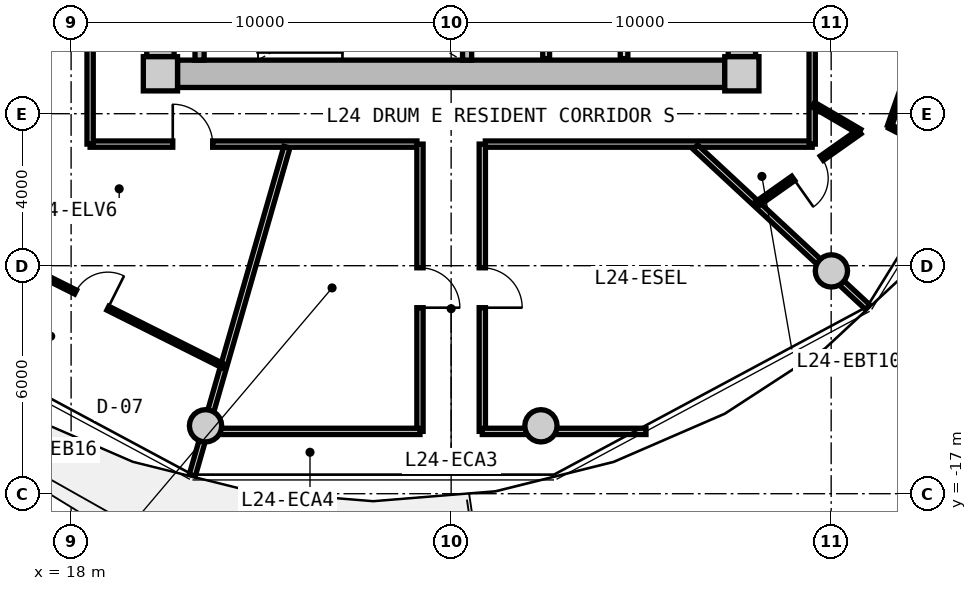
"""IFC4 building model, lengths in metres.
Left out: names, types, materials, properties, quantities, classifications, styles, units other than length and angle.
Written with IfcOpenShell. Run it as: python <this file> out.ifc"""

import sys

from ifc_helpers import new_model, si_unit, direction, frame, frame_2d, origin, origin_2d, place, context, subcontext, project, spatial, rectangle, circle, extrude, source, transform, mapped, element, fill, save


model = new_model("IFC4")
c1 = context("Model", 3, precision=1e-05, world=origin(), true_north=direction((0.0, 1.0)))
c2 = subcontext(c1, "Body", "Model", "MODEL_VIEW")
j1 = project(units=[si_unit("LENGTHUNIT", "METRE"), si_unit("PLANEANGLEUNIT", "RADIAN")], contexts=[c1])
p1 = place(None, origin())
s1 = spatial("IfcSite", under=j1, at=p1, CompositionType="ELEMENT")
p2 = place(p1, origin())
s2 = spatial("IfcBuilding", under=s1, at=p2, CompositionType="ELEMENT")
p3 = place(p2, frame((0.0, 0.0, 81.0)))
s3 = spatial("IfcBuildingStorey", under=s2, at=p3, CompositionType="ELEMENT", Elevation=81.0)
m1 = source(origin(), c2, "Body", "SweptSolid", [
    extrude(rectangle(XDim=0.9, YDim=0.9, at=origin_2d()), origin(), (0.0, 0.0, 1.0), 3.05),
])
for number, where, z_axis, x_axis in (
    (1, (20.35, -5.95, 0.0), (0.0, 0.0, 1.0), (1.0, 0.0, 0.0)),
    (2, (35.65, -5.95, 0.0), (0.0, 0.0, 1.0), (1.0, 0.0, 0.0)),
):
    element("IfcColumn", number, at=place(p3, frame(where, z_axis=z_axis, x_axis=x_axis)), inside=s3, PredefinedType="COLUMN", context=c2, shape_type="MappedRepresentation", body=[
        mapped(m1, transform((0.0, 0.0, 0.0), x_axis=(1.0, 0.0, 0.0), y_axis=(0.0, 1.0, 0.0), z_axis=(0.0, 0.0, 1.0), scale=1.0)),
    ])
m2 = source(origin(), c2, "Body", "SweptSolid", [
    extrude(rectangle(XDim=14.4, YDim=0.72, at=frame_2d((7.2, 0.0))), origin(), (0.0, 0.0, 1.0), 2.79),
])
p4 = place(p3, frame((35.2, -5.95, 0.0), z_axis=(0.0, 0.0, 1.0), x_axis=(-1.0, 0.0, 0.0)))
e3 = element("IfcWall", 3, at=p4, inside=s3, PredefinedType="SHEAR", context=c2, shape_type="MappedRepresentation", body=[
    mapped(m2, transform((0.0, 0.0, 0.0), x_axis=(1.0, 0.0, 0.0), y_axis=(0.0, 1.0, 0.0), z_axis=(0.0, 0.0, 1.0), scale=1.0)),
])
m3 = source(origin(), c2, "Body", "SweptSolid", [
    extrude(rectangle(XDim=11.0, YDim=0.72, at=frame_2d((5.5, 0.0))), origin(), (0.0, 0.0, 1.0), 2.79),
])
p5 = place(p3, frame((20.35, -5.5, 0.0), z_axis=(0.0, 0.0, 1.0), x_axis=(0.0, 1.0, 0.0)))
e4 = element("IfcWall", 4, at=p5, inside=s3, PredefinedType="SHEAR", context=c2, shape_type="MappedRepresentation", body=[
    mapped(m3, transform((0.0, 0.0, 0.0), x_axis=(1.0, 0.0, 0.0), y_axis=(0.0, 1.0, 0.0), z_axis=(0.0, 0.0, 1.0), scale=1.0)),
])
p6 = place(p5, frame((3.8, 0.0, 0.0)))
e5 = element("IfcOpeningElement", 5, at=p6, cuts=e4, PredefinedType="OPENING", context=c2, shape_type="SweptSolid", body=[
    extrude(rectangle(XDim=1.2, YDim=2.15, at=frame_2d((0.6, 1.075))), frame((0.0, 0.37, 0.0), z_axis=(0.0, -1.0, 0.0), x_axis=(1.0, 0.0, 0.0)), (0.0, 0.0, 1.0), 0.74),
])
p7 = place(p3, frame((35.65, 5.5, 0.0), z_axis=(0.0, 0.0, 1.0), x_axis=(0.0, -1.0, 0.0)))
e6 = element("IfcWall", 6, at=p7, inside=s3, PredefinedType="SHEAR", context=c2, shape_type="MappedRepresentation", body=[
    mapped(m3, transform((0.0, 0.0, 0.0), x_axis=(1.0, 0.0, 0.0), y_axis=(0.0, 1.0, 0.0), z_axis=(0.0, 0.0, 1.0), scale=1.0)),
])
p8 = place(p7, frame((5.65, 0.0, 0.0)))
e7 = element("IfcOpeningElement", 7, at=p8, cuts=e6, PredefinedType="OPENING", context=c2, shape_type="SweptSolid", body=[
    extrude(rectangle(XDim=1.2, YDim=2.15, at=frame_2d((0.6, 1.075))), frame((0.0, 0.37, 0.0), z_axis=(0.0, -1.0, 0.0), x_axis=(1.0, 0.0, 0.0)), (0.0, 0.0, 1.0), 0.74),
])
m4 = source(origin(), c2, "Body", "SweptSolid", [
    extrude(circle(Radius=0.425, at=origin_2d()), origin(), (0.0, 0.0, 1.0), 3.05),
])
for number, where, z_axis, x_axis in (
    (8, (21.537, -15.213, 0.0), (0.0, 0.0, 1.0), (1.0, 0.0, 0.0)),
    (9, (30.363, -15.213, 0.0), (0.0, 0.0, 1.0), (1.0, 0.0, 0.0)),
    (10, (38.006, -11.137, 0.0), (0.0, 0.0, 1.0), (1.0, 0.0, 0.0)),
):
    element("IfcColumn", number, at=place(p3, frame(where, z_axis=z_axis, x_axis=x_axis)), inside=s3, PredefinedType="COLUMN", context=c2, shape_type="MappedRepresentation", body=[
        mapped(m4, transform((0.0, 0.0, 0.0), x_axis=(1.0, 0.0, 0.0), y_axis=(0.0, 1.0, 0.0), z_axis=(0.0, 0.0, 1.0), scale=1.0)),
    ])
m5 = source(origin(), c2, "Body", "SweptSolid", [
    extrude(rectangle(XDim=3.14, YDim=0.24, at=frame_2d((1.57, 0.0))), origin(), (0.0, 0.0, 1.0), 2.79),
])
for number, where, z_axis, x_axis in (
    (11, (21.38, -5.59, 0.0), (0.0, 0.0, 1.0), (0.0, 1.0, 0.0)),
    (12, (28.42, -5.59, 0.0), (0.0, 0.0, 1.0), (0.0, 1.0, 0.0)),
):
    element("IfcWall", number, at=place(p3, frame(where, z_axis=z_axis, x_axis=x_axis)), inside=s3, PredefinedType="PARTITIONING", context=c2, shape_type="MappedRepresentation", body=[
        mapped(m5, transform((0.0, 0.0, 0.0), x_axis=(1.0, 0.0, 0.0), y_axis=(0.0, 1.0, 0.0), z_axis=(0.0, 0.0, 1.0), scale=1.0)),
    ])
m6 = source(origin(), c2, "Body", "SweptSolid", [
    extrude(rectangle(XDim=3.8, YDim=0.2, at=frame_2d((1.9, 0.0))), origin(), (0.0, 0.0, 1.0), 2.775),
])
p9 = place(p3, frame((32.55, -5.55, 0.0), z_axis=(0.0, 0.0, 1.0), x_axis=(0.0, 1.0, 0.0)))
e13 = element("IfcWall", 13, at=p9, inside=s3, PredefinedType="PARTITIONING", context=c2, shape_type="MappedRepresentation", body=[
    mapped(m6, transform((0.0, 0.0, 0.0), x_axis=(1.0, 0.0, 0.0), y_axis=(0.0, 1.0, 0.0), z_axis=(0.0, 0.0, 1.0), scale=1.0)),
])
m7 = source(origin(), c2, "Body", "SweptSolid", [
    extrude(rectangle(XDim=3.22, YDim=0.18, at=frame_2d((1.61, 0.0))), origin(), (0.0, 0.0, 1.0), 2.775),
])
p10 = place(p3, frame((30.5, -5.55, 0.0), z_axis=(0.0, 0.0, 1.0), x_axis=(0.0, 1.0, 0.0)))
e14 = element("IfcWall", 14, at=p10, inside=s3, PredefinedType="PARTITIONING", context=c2, shape_type="MappedRepresentation", body=[
    mapped(m7, transform((0.0, 0.0, 0.0), x_axis=(1.0, 0.0, 0.0), y_axis=(0.0, 1.0, 0.0), z_axis=(0.0, 0.0, 1.0), scale=1.0)),
])
m8 = source(origin(), c2, "Body", "SweptSolid", [
    extrude(rectangle(XDim=8.6, YDim=0.165, at=frame_2d((4.3, 0.0))), origin(), (0.0, 0.0, 1.0), 2.775),
])
p11 = place(p3, frame((37.5, -7.8, 0.0), z_axis=(0.0, 0.0, 1.0), x_axis=(-1.0, 0.0, 0.0)))
e15 = element("IfcWall", 15, at=p11, inside=s3, PredefinedType="PARTITIONING", context=c2, shape_type="MappedRepresentation", body=[
    mapped(m8, transform((0.0, 0.0, 0.0), x_axis=(1.0, 0.0, 0.0), y_axis=(0.0, 1.0, 0.0), z_axis=(0.0, 0.0, 1.0), scale=1.0)),
])
p12 = place(p3, frame((27.1, -7.8, 0.0), z_axis=(0.0, 0.0, 1.0), x_axis=(-1.0, 0.0, 0.0)))
e16 = element("IfcWall", 16, at=p12, inside=s3, PredefinedType="PARTITIONING", context=c2, shape_type="MappedRepresentation", body=[
    mapped(m8, transform((0.0, 0.0, 0.0), x_axis=(1.0, 0.0, 0.0), y_axis=(0.0, 1.0, 0.0), z_axis=(0.0, 0.0, 1.0), scale=1.0)),
])
p13 = place(p12, frame((5.375, 0.0, 0.0)))
e17 = element("IfcOpeningElement", 17, at=p13, cuts=e16, PredefinedType="OPENING", context=c2, shape_type="SweptSolid", body=[
    extrude(rectangle(XDim=1.05, YDim=2.15, at=frame_2d((0.525, 1.075))), frame((0.0, 0.093, 0.0), z_axis=(0.0, -1.0, 0.0), x_axis=(1.0, 0.0, 0.0)), (0.0, 0.0, 1.0), 0.185),
])
m9 = source(origin(), c2, "Body", "SweptSolid", [
    extrude(rectangle(XDim=15.6, YDim=0.165, at=frame_2d((7.8, 0.0))), origin(), (0.0, 0.0, 1.0), 2.775),
])
p14 = place(p3, frame((18.5, -7.8, 0.0), z_axis=(0.0, 0.0, 1.0), x_axis=(0.0, 1.0, 0.0)))
e18 = element("IfcWall", 18, at=p14, inside=s3, PredefinedType="PARTITIONING", context=c2, shape_type="MappedRepresentation", body=[
    mapped(m9, transform((0.0, 0.0, 0.0), x_axis=(1.0, 0.0, 0.0), y_axis=(0.0, 1.0, 0.0), z_axis=(0.0, 0.0, 1.0), scale=1.0)),
])
p15 = place(p14, frame((11.623, 0.0, 0.0)))
e19 = element("IfcOpeningElement", 19, at=p15, cuts=e18, PredefinedType="OPENING", context=c2, shape_type="SweptSolid", body=[
    extrude(rectangle(XDim=1.25, YDim=2.2, at=frame_2d((0.625, 1.1))), frame((0.0, 0.093, 0.0), z_axis=(0.0, -1.0, 0.0), x_axis=(1.0, 0.0, 0.0)), (0.0, 0.0, 1.0), 0.185),
])
p16 = place(p14, frame((7.175, 0.0, 0.0)))
e20 = element("IfcOpeningElement", 20, at=p16, cuts=e18, PredefinedType="OPENING", context=c2, shape_type="SweptSolid", body=[
    extrude(rectangle(XDim=1.25, YDim=2.2, at=frame_2d((0.625, 1.1))), frame((0.0, 0.093, 0.0), z_axis=(0.0, -1.0, 0.0), x_axis=(1.0, 0.0, 0.0)), (0.0, 0.0, 1.0), 0.185),
])
p17 = place(p3, frame((37.5, 7.8, 0.0), z_axis=(0.0, 0.0, 1.0), x_axis=(0.0, -1.0, 0.0)))
e21 = element("IfcWall", 21, at=p17, inside=s3, PredefinedType="PARTITIONING", context=c2, shape_type="MappedRepresentation", body=[
    mapped(m9, transform((0.0, 0.0, 0.0), x_axis=(1.0, 0.0, 0.0), y_axis=(0.0, 1.0, 0.0), z_axis=(0.0, 0.0, 1.0), scale=1.0)),
])
p18 = place(p17, frame((6.87, 0.0, 0.0)))
e22 = element("IfcOpeningElement", 22, at=p18, cuts=e21, PredefinedType="OPENING", context=c2, shape_type="SweptSolid", body=[
    extrude(rectangle(XDim=1.05, YDim=2.15, at=frame_2d((0.525, 1.075))), frame((0.0, 0.093, 0.0), z_axis=(0.0, -1.0, 0.0), x_axis=(1.0, 0.0, 0.0)), (0.0, 0.0, 1.0), 0.185),
])
m10 = source(origin(), c2, "Body", "SweptSolid", [
    extrude(rectangle(XDim=8.989, YDim=0.165, at=frame_2d((4.495, 0.0))), origin(), (0.0, 0.0, 1.0), 2.275),
])
p19 = place(p3, frame((23.678, -7.88, 0.0), z_axis=(0.0, 0.0, 1.0), x_axis=(-0.27702323008, -0.960863221274, 0.0)))
e23 = element("IfcWall", 23, at=p19, inside=s3, PredefinedType="PARTITIONING", context=c2, shape_type="MappedRepresentation", body=[
    mapped(m10, transform((0.0, 0.0, 0.0), x_axis=(1.0, 0.0, 0.0), y_axis=(0.0, 1.0, 0.0), z_axis=(0.0, 0.0, 1.0), scale=1.0)),
])
m11 = source(origin(), c2, "Body", "SweptSolid", [
    extrude(rectangle(XDim=6.187, YDim=0.165, at=frame_2d((3.093, 0.0))), origin(), (0.0, 0.0, 1.0), 2.275),
])
p20 = place(p3, frame((34.429, -7.88, 0.0), z_axis=(0.0, 0.0, 1.0), x_axis=(0.732501077882, -0.680765870841, 0.0)))
e24 = element("IfcWall", 24, at=p20, inside=s3, PredefinedType="PARTITIONING", context=c2, shape_type="MappedRepresentation", body=[
    mapped(m11, transform((0.0, 0.0, 0.0), x_axis=(1.0, 0.0, 0.0), y_axis=(0.0, 1.0, 0.0), z_axis=(0.0, 0.0, 1.0), scale=1.0)),
])
m12 = source(origin(), c2, "Body", "SweptSolid", [
    extrude(rectangle(XDim=7.56, YDim=0.165, at=frame_2d((3.78, 0.0))), origin(), (0.0, 0.0, 1.0), 2.775),
])
p21 = place(p3, frame((27.18, -15.36, 0.0), z_axis=(0.0, 0.0, 1.0), x_axis=(0.0, 1.0, 0.0)))
e25 = element("IfcWall", 25, at=p21, inside=s3, PredefinedType="PARTITIONING", context=c2, shape_type="MappedRepresentation", body=[
    mapped(m12, transform((0.0, 0.0, 0.0), x_axis=(1.0, 0.0, 0.0), y_axis=(0.0, 1.0, 0.0), z_axis=(0.0, 0.0, 1.0), scale=1.0)),
])
p22 = place(p21, frame((3.255, 0.0, 0.0)))
e26 = element("IfcOpeningElement", 26, at=p22, cuts=e25, PredefinedType="OPENING", context=c2, shape_type="SweptSolid", body=[
    extrude(rectangle(XDim=1.05, YDim=2.15, at=frame_2d((0.525, 1.075))), frame((0.0, 0.093, 0.0), z_axis=(0.0, -1.0, 0.0), x_axis=(1.0, 0.0, 0.0)), (0.0, 0.0, 1.0), 0.185),
])
m13 = source(origin(), c2, "Body", "SweptSolid", [
    extrude(rectangle(XDim=5.814, YDim=0.165, at=frame_2d((2.907, 0.0))), origin(), (0.0, 0.0, 1.0), 2.275),
])
p23 = place(p3, frame((21.366, -15.36, 0.0), z_axis=(0.0, 0.0, 1.0), x_axis=(1.0, 0.0, 0.0)))
e27 = element("IfcWall", 27, at=p23, inside=s3, PredefinedType="PARTITIONING", context=c2, shape_type="MappedRepresentation", body=[
    mapped(m13, transform((0.0, 0.0, 0.0), x_axis=(1.0, 0.0, 0.0), y_axis=(0.0, 1.0, 0.0), z_axis=(0.0, 0.0, 1.0), scale=1.0)),
])
p24 = place(p3, frame((28.82, -15.36, 0.0), z_axis=(0.0, 0.0, 1.0), x_axis=(0.0, 1.0, 0.0)))
e28 = element("IfcWall", 28, at=p24, inside=s3, PredefinedType="PARTITIONING", context=c2, shape_type="MappedRepresentation", body=[
    mapped(m12, transform((0.0, 0.0, 0.0), x_axis=(1.0, 0.0, 0.0), y_axis=(0.0, 1.0, 0.0), z_axis=(0.0, 0.0, 1.0), scale=1.0)),
])
p25 = place(p24, frame((3.255, 0.0, 0.0)))
e29 = element("IfcOpeningElement", 29, at=p25, cuts=e28, PredefinedType="OPENING", context=c2, shape_type="SweptSolid", body=[
    extrude(rectangle(XDim=1.05, YDim=2.15, at=frame_2d((0.525, 1.075))), frame((0.0, 0.093, 0.0), z_axis=(0.0, -1.0, 0.0), x_axis=(1.0, 0.0, 0.0)), (0.0, 0.0, 1.0), 0.185),
])
m14 = source(origin(), c2, "Body", "SweptSolid", [
    extrude(rectangle(XDim=4.307, YDim=0.165, at=frame_2d((2.153, 0.0))), origin(), (0.0, 0.0, 1.0), 2.275),
])
p26 = place(p3, frame((28.82, -15.36, 0.0), z_axis=(0.0, 0.0, 1.0), x_axis=(1.0, 0.0, 0.0)))
e30 = element("IfcWall", 30, at=p26, inside=s3, PredefinedType="PARTITIONING", context=c2, shape_type="MappedRepresentation", body=[
    mapped(m14, transform((0.0, 0.0, 0.0), x_axis=(1.0, 0.0, 0.0), y_axis=(0.0, 1.0, 0.0), z_axis=(0.0, 0.0, 1.0), scale=1.0)),
])
m15 = source(origin(), c2, "Body", "SweptSolid", [
    extrude(rectangle(XDim=7.767, YDim=0.115, at=frame_2d((3.884, 0.0))), origin(), (0.0, 0.0, 1.0), 2.775),
])
p27 = place(p3, frame((15.07, -10.167, 0.0), z_axis=(0.0, 0.0, 1.0), x_axis=(0.894188177352, -0.447691303783, 0.0)))
e31 = element("IfcWall", 31, at=p27, inside=s3, PredefinedType="PARTITIONING", context=c2, shape_type="MappedRepresentation", body=[
    mapped(m15, transform((0.0, 0.0, 0.0), x_axis=(1.0, 0.0, 0.0), y_axis=(0.0, 1.0, 0.0), z_axis=(0.0, 0.0, 1.0), scale=1.0)),
])
p28 = place(p27, frame((3.409, 0.0, 0.0)))
e32 = element("IfcOpeningElement", 32, at=p28, cuts=e31, PredefinedType="OPENING", context=c2, shape_type="SweptSolid", body=[
    extrude(rectangle(XDim=0.95, YDim=2.1, at=frame_2d((0.475, 1.05))), frame((0.0, 0.067, 0.0), z_axis=(0.0, -1.0, 0.0), x_axis=(1.0, 0.0, 0.0)), (0.0, 0.0, 1.0), 0.135),
])
m16 = source(origin(), c2, "Body", "SweptSolid", [
    extrude(rectangle(XDim=1.407, YDim=0.14, at=frame_2d((0.704, 0.0))), origin(), (0.0, 0.0, 1.0), 2.775),
])
p29 = place(p3, frame((37.53, -6.762, 0.0), z_axis=(0.0, 0.0, 1.0), x_axis=(0.863539718977, -0.504280828258, 0.0)))
e33 = element("IfcWall", 33, at=p29, inside=s3, PredefinedType="PARTITIONING", context=c2, shape_type="MappedRepresentation", body=[
    mapped(m16, transform((0.0, 0.0, 0.0), x_axis=(1.0, 0.0, 0.0), y_axis=(0.0, 1.0, 0.0), z_axis=(0.0, 0.0, 1.0), scale=1.0)),
])
m17 = source(origin(), c2, "Body", "SweptSolid", [
    extrude(rectangle(XDim=3.347, YDim=0.14, at=frame_2d((1.673, 0.0))), origin(), (0.0, 0.0, 1.0), 2.775),
])
p30 = place(p3, frame((38.745, -7.472, 0.0), z_axis=(0.0, 0.0, 1.0), x_axis=(-0.81705680263, -0.576557179537, 0.0)))
e34 = element("IfcWall", 34, at=p30, inside=s3, PredefinedType="PARTITIONING", context=c2, shape_type="MappedRepresentation", body=[
    mapped(m17, transform((0.0, 0.0, 0.0), x_axis=(1.0, 0.0, 0.0), y_axis=(0.0, 1.0, 0.0), z_axis=(0.0, 0.0, 1.0), scale=1.0)),
])
p31 = place(p30, frame((1.214, 0.0, 0.0)))
e35 = element("IfcOpeningElement", 35, at=p31, cuts=e34, PredefinedType="OPENING", context=c2, shape_type="SweptSolid", body=[
    extrude(rectangle(XDim=0.92, YDim=2.1, at=frame_2d((0.46, 1.05))), frame((0.0, 0.08, 0.0), z_axis=(0.0, -1.0, 0.0), x_axis=(1.0, 0.0, 0.0)), (0.0, 0.0, 1.0), 0.16),
])
m18 = source(origin(), c2, "Body", "SweptSolid", [
    extrude(rectangle(XDim=2.031, YDim=0.115, at=frame_2d((1.016, 0.0))), origin(), (0.0, 0.0, 1.0), 2.775),
])
p32 = place(p3, frame((39.535, -7.33, 0.0), z_axis=(0.0, 0.0, 1.0), x_axis=(0.889297578836, -0.457329002226, 0.0)))
e36 = element("IfcWall", 36, at=p32, inside=s3, PredefinedType="PARTITIONING", context=c2, shape_type="MappedRepresentation", body=[
    mapped(m18, transform((0.0, 0.0, 0.0), x_axis=(1.0, 0.0, 0.0), y_axis=(0.0, 1.0, 0.0), z_axis=(0.0, 0.0, 1.0), scale=1.0)),
])
m19 = source(origin(), c2, "Body", "SweptSolid", [
    extrude(rectangle(XDim=3.826, YDim=0.115, at=frame_2d((1.913, 0.0))), origin(), (0.0, 0.0, 1.0), 2.775),
])
p33 = place(p3, frame((39.535, -7.33, 0.0), z_axis=(0.0, 0.0, 1.0), x_axis=(0.330452740212, 0.943822539721, 0.0)))
e37 = element("IfcWall", 37, at=p33, inside=s3, PredefinedType="PARTITIONING", context=c2, shape_type="MappedRepresentation", body=[
    mapped(m19, transform((0.0, 0.0, 0.0), x_axis=(1.0, 0.0, 0.0), y_axis=(0.0, 1.0, 0.0), z_axis=(0.0, 0.0, 1.0), scale=1.0)),
])
p34 = place(p33, frame((1.438, 0.0, 0.0)))
e38 = element("IfcOpeningElement", 38, at=p34, cuts=e37, PredefinedType="OPENING", context=c2, shape_type="SweptSolid", body=[
    extrude(rectangle(XDim=0.95, YDim=2.1, at=frame_2d((0.475, 1.05))), frame((0.0, 0.067, 0.0), z_axis=(0.0, -1.0, 0.0), x_axis=(1.0, 0.0, 0.0)), (0.0, 0.0, 1.0), 0.135),
])
m20 = source(origin(), c2, "Body", "SweptSolid", [
    extrude(rectangle(XDim=1.05, YDim=2.15, at=frame_2d((0.525, 1.075))), frame((0.0, 0.025, 0.0), z_axis=(0.0, -1.0, 0.0), x_axis=(1.0, 0.0, 0.0)), (0.0, 0.0, 1.0), 0.05),
])
p35 = place(p22, frame((1.05, 0.0, 0.0), z_axis=(0.0, 0.0, 1.0), x_axis=(-1.0, 0.0, 0.0)))
e39 = element("IfcDoor", 39, at=p35, inside=s3, OperationType="SINGLE_SWING_RIGHT", PredefinedType="DOOR", context=c2, shape_type="MappedRepresentation", body=[
    mapped(m20, transform((0.0, 0.0, 0.0), x_axis=(1.0, 0.0, 0.0), y_axis=(0.0, 1.0, 0.0), z_axis=(0.0, 0.0, 1.0), scale=1.0)),
])
fill(e26, e39)
p36 = place(p25, frame((1.05, 0.0, 0.0), z_axis=(0.0, 0.0, 1.0), x_axis=(-1.0, 0.0, 0.0)))
e40 = element("IfcDoor", 40, at=p36, inside=s3, OperationType="SINGLE_SWING_RIGHT", PredefinedType="DOOR", context=c2, shape_type="MappedRepresentation", body=[
    mapped(m20, transform((0.0, 0.0, 0.0), x_axis=(1.0, 0.0, 0.0), y_axis=(0.0, 1.0, 0.0), z_axis=(0.0, 0.0, 1.0), scale=1.0)),
])
fill(e29, e40)
p37 = place(p13, frame((1.05, 0.0, 0.0), z_axis=(0.0, 0.0, 1.0), x_axis=(-1.0, 0.0, 0.0)))
e41 = element("IfcDoor", 41, at=p37, inside=s3, OperationType="SINGLE_SWING_LEFT", PredefinedType="DOOR", context=c2, shape_type="MappedRepresentation", body=[
    mapped(m20, transform((0.0, 0.0, 0.0), x_axis=(1.0, 0.0, 0.0), y_axis=(0.0, 1.0, 0.0), z_axis=(0.0, 0.0, 1.0), scale=1.0)),
])
fill(e17, e41)
m21 = source(origin(), c2, "Body", "SweptSolid", [
    extrude(rectangle(XDim=0.95, YDim=2.1, at=frame_2d((0.475, 1.05))), frame((0.0, 0.025, 0.0), z_axis=(0.0, -1.0, 0.0), x_axis=(1.0, 0.0, 0.0)), (0.0, 0.0, 1.0), 0.05),
])
p38 = place(p28, origin())
e42 = element("IfcDoor", 42, at=p38, inside=s3, OperationType="SINGLE_SWING_RIGHT", PredefinedType="DOOR", context=c2, shape_type="MappedRepresentation", body=[
    mapped(m21, transform((0.0, 0.0, 0.0), x_axis=(1.0, 0.0, 0.0), y_axis=(0.0, 1.0, 0.0), z_axis=(0.0, 0.0, 1.0), scale=1.0)),
])
fill(e32, e42)
m22 = source(origin(), c2, "Body", "SweptSolid", [
    extrude(rectangle(XDim=0.92, YDim=2.1, at=frame_2d((0.46, 1.05))), frame((0.0, 0.025, 0.0), z_axis=(0.0, -1.0, 0.0), x_axis=(1.0, 0.0, 0.0)), (0.0, 0.0, 1.0), 0.05),
])
p39 = place(p31, origin())
e43 = element("IfcDoor", 43, at=p39, inside=s3, OperationType="SINGLE_SWING_RIGHT", PredefinedType="DOOR", context=c2, shape_type="MappedRepresentation", body=[
    mapped(m22, transform((0.0, 0.0, 0.0), x_axis=(1.0, 0.0, 0.0), y_axis=(0.0, 1.0, 0.0), z_axis=(0.0, 0.0, 1.0), scale=1.0)),
])
fill(e35, e43)
save(model, sys.argv[1])
